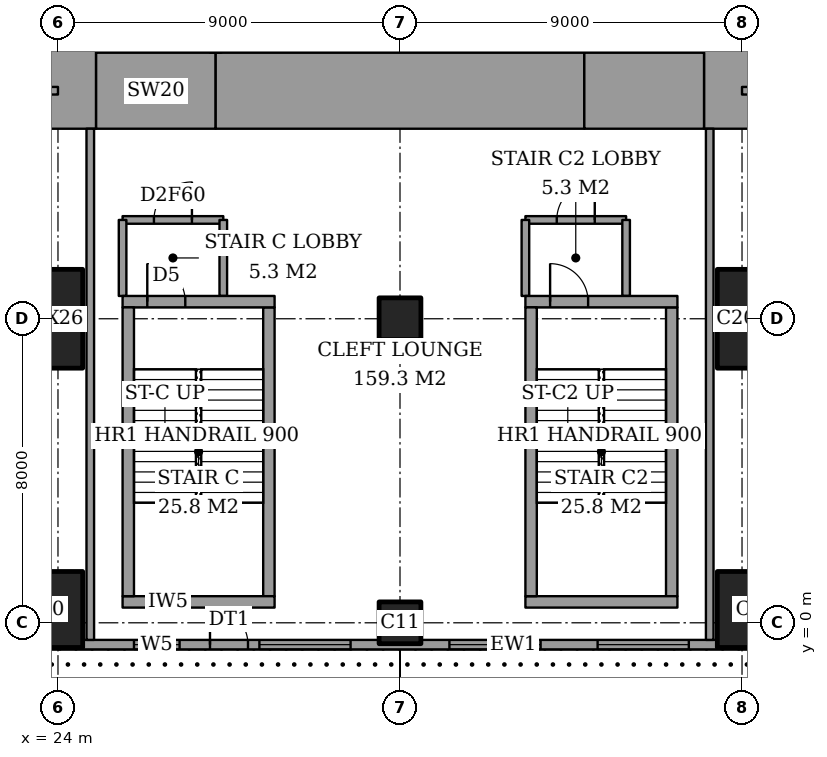
"""IFC4 building model, lengths in metres.
Left out: names, types, materials, properties, quantities, classifications, styles, units other than length and angle.
Written with IfcOpenShell. Run it as: python <this file> out.ifc"""

import sys

from ifc_helpers import new_model, si_unit, direction, frame, frame_2d, origin, origin_2d, place, context, subcontext, project, spatial, rectangle, extrude, element, fill, save


model = new_model("IFC4")
c1 = context("Model", 3, precision=1e-05, world=origin(), true_north=direction((0.0, 1.0)))
c2 = subcontext(c1, "Body", "Model", "MODEL_VIEW")
j1 = project(units=[si_unit("LENGTHUNIT", "METRE"), si_unit("PLANEANGLEUNIT", "RADIAN")], contexts=[c1])
p1 = place(None, origin())
s1 = spatial("IfcSite", under=j1, at=p1, CompositionType="ELEMENT")
p2 = place(p1, origin())
s2 = spatial("IfcBuilding", under=s1, at=p2, CompositionType="ELEMENT")
p3 = place(p2, frame((0.0, 0.0, 16.0)))
s3 = spatial("IfcBuildingStorey", under=s2, at=p3, CompositionType="ELEMENT", Elevation=16.0)
p4 = place(p3, frame((23.65, 0.35, 0.0), z_axis=(0.0, 0.0, 1.0), x_axis=(1.0, 0.0, 0.0)))
e1 = element("IfcColumn", 1, at=p4, inside=s3, PredefinedType="COLUMN", context=c2, shape_type="SweptSolid", body=[
    extrude(rectangle(XDim=2.0, YDim=2.0, at=origin_2d()), origin(), (0.0, 0.0, 1.0), 5.0),
])
p5 = place(p3, frame((23.65, 8.0, 0.0), z_axis=(0.0, 0.0, 1.0), x_axis=(1.0, 0.0, 0.0)))
e2 = element("IfcColumn", 2, at=p5, inside=s3, PredefinedType="COLUMN", context=c2, shape_type="SweptSolid", body=[
    extrude(rectangle(XDim=2.0, YDim=2.6, at=origin_2d()), origin(), (0.0, 0.0, 1.0), 5.0),
])
for number, where, z_axis, x_axis in (
    (3, (33.0, 0.0, 0.0), (0.0, 0.0, 1.0), (1.0, 0.0, 0.0)),
    (4, (33.0, 8.0, 0.0), (0.0, 0.0, 1.0), (1.0, 0.0, 0.0)),
):
    element("IfcColumn", number, at=place(p3, frame(where, z_axis=z_axis, x_axis=x_axis)), inside=s3, PredefinedType="COLUMN", context=c2, shape_type="SweptSolid", body=[
        extrude(rectangle(XDim=1.1, YDim=1.1, at=origin_2d()), origin(), (0.0, 0.0, 1.0), 5.0),
    ])
p6 = place(p3, frame((42.35, 0.35, 0.0), z_axis=(0.0, 0.0, 1.0), x_axis=(1.0, 0.0, 0.0)))
e5 = element("IfcColumn", 5, at=p6, inside=s3, PredefinedType="COLUMN", context=c2, shape_type="SweptSolid", body=[
    extrude(rectangle(XDim=2.0, YDim=2.0, at=origin_2d()), origin(), (0.0, 0.0, 1.0), 5.0),
])
p7 = place(p3, frame((42.35, 8.0, 0.0), z_axis=(0.0, 0.0, 1.0), x_axis=(1.0, 0.0, 0.0)))
e6 = element("IfcColumn", 6, at=p7, inside=s3, PredefinedType="COLUMN", context=c2, shape_type="SweptSolid", body=[
    extrude(rectangle(XDim=2.0, YDim=2.6, at=origin_2d()), origin(), (0.0, 0.0, 1.0), 5.0),
])
p8 = place(p3, frame((25.0, 14.0, 0.0), z_axis=(0.0, 0.0, 1.0), x_axis=(1.0, 0.0, 0.0)))
e7 = element("IfcWall", 7, at=p8, inside=s3, PredefinedType="SHEAR", context=c2, shape_type="SweptSolid", body=[
    extrude(rectangle(XDim=3.15, YDim=2.0, at=frame_2d((1.575, 0.0))), origin(), (0.0, 0.0, 1.0), 5.0),
])
p9 = place(p3, frame((28.15, 14.0, 0.0), z_axis=(0.0, 0.0, 1.0), x_axis=(1.0, 0.0, 0.0)))
e8 = element("IfcWall", 8, at=p9, inside=s3, PredefinedType="SHEAR", context=c2, shape_type="SweptSolid", body=[
    extrude(rectangle(XDim=9.7, YDim=2.0, at=frame_2d((4.85, 0.0))), origin(), (0.0, 0.0, 1.0), 5.0),
])
p10 = place(p3, frame((37.85, 14.0, 0.0), z_axis=(0.0, 0.0, 1.0), x_axis=(1.0, 0.0, 0.0)))
e9 = element("IfcWall", 9, at=p10, inside=s3, PredefinedType="SHEAR", context=c2, shape_type="SweptSolid", body=[
    extrude(rectangle(XDim=3.15, YDim=2.0, at=frame_2d((1.575, 0.0))), origin(), (0.0, 0.0, 1.0), 5.0),
])
p11 = place(p3, frame((24.3, 13.0, 0.0), z_axis=(0.0, 0.0, 1.0), x_axis=(0.0, 1.0, 0.0)))
e10 = element("IfcWall", 10, at=p11, inside=s3, PredefinedType="SHEAR", context=c2, shape_type="SweptSolid", body=[
    extrude(rectangle(XDim=10.15, YDim=1.4, at=frame_2d((5.075, 0.0))), origin(), (0.0, 0.0, 1.0), 5.0),
])
p12 = place(p3, frame((41.7, 13.0, 0.0), z_axis=(0.0, 0.0, 1.0), x_axis=(0.0, 1.0, 0.0)))
e11 = element("IfcWall", 11, at=p12, inside=s3, PredefinedType="SHEAR", context=c2, shape_type="SweptSolid", body=[
    extrude(rectangle(XDim=11.85, YDim=1.4, at=frame_2d((5.925, 0.0))), origin(), (0.0, 0.0, 1.0), 5.0),
])
p13 = place(p12, frame((7.5, 0.0, 0.0)))
e12 = element("IfcOpeningElement", 12, at=p13, cuts=e11, PredefinedType="OPENING", context=c2, shape_type="SweptSolid", body=[
    extrude(rectangle(XDim=1.8, YDim=2.4, at=frame_2d((0.9, 1.2))), frame((0.0, 0.71, 0.0), z_axis=(0.0, -1.0, 0.0), x_axis=(1.0, 0.0, 0.0)), (0.0, 0.0, 1.0), 1.42),
])
p14 = place(p3, frame((3.175, -0.575, 0.0), z_axis=(0.0, 0.0, 1.0), x_axis=(1.0, 0.0, 0.0)))
e13 = element("IfcWall", 13, at=p14, inside=s3, PredefinedType="SOLIDWALL", context=c2, shape_type="SweptSolid", body=[
    extrude(rectangle(XDim=59.65, YDim=0.25, at=frame_2d((29.825, 0.0))), origin(), (0.0, 0.0, 1.0), 5.0),
])
p15 = place(p14, frame((8.325, 0.0, 0.0)))
e14 = element("IfcOpeningElement", 14, at=p15, cuts=e13, PredefinedType="OPENING", context=c2, shape_type="SweptSolid", body=[
    extrude(rectangle(XDim=1.0, YDim=2.4, at=frame_2d((0.5, 1.2))), frame((0.0, 0.135, 0.0), z_axis=(0.0, -1.0, 0.0), x_axis=(1.0, 0.0, 0.0)), (0.0, 0.0, 1.0), 0.27),
])
p16 = place(p14, frame((15.45, 0.0, 0.6)))
e15 = element("IfcOpeningElement", 15, at=p16, cuts=e13, PredefinedType="OPENING", context=c2, shape_type="SweptSolid", body=[
    extrude(rectangle(XDim=2.4, YDim=3.0, at=frame_2d((1.2, 1.5))), frame((0.0, 0.135, 0.0), z_axis=(0.0, -1.0, 0.0), x_axis=(1.0, 0.0, 0.0)), (0.0, 0.0, 1.0), 0.27),
])
p17 = place(p14, frame((24.825, 0.0, 0.0)))
e16 = element("IfcOpeningElement", 16, at=p17, cuts=e13, PredefinedType="OPENING", context=c2, shape_type="SweptSolid", body=[
    extrude(rectangle(XDim=1.0, YDim=2.4, at=frame_2d((0.5, 1.2))), frame((0.0, 0.135, 0.0), z_axis=(0.0, -1.0, 0.0), x_axis=(1.0, 0.0, 0.0)), (0.0, 0.0, 1.0), 0.27),
])
p18 = place(p14, frame((22.825, 0.0, 0.6)))
e17 = element("IfcOpeningElement", 17, at=p18, cuts=e13, PredefinedType="OPENING", context=c2, shape_type="SweptSolid", body=[
    extrude(rectangle(XDim=1.2, YDim=3.0, at=frame_2d((0.6, 1.5))), frame((0.0, 0.135, 0.0), z_axis=(0.0, -1.0, 0.0), x_axis=(1.0, 0.0, 0.0)), (0.0, 0.0, 1.0), 0.27),
])
p19 = place(p14, frame((26.125, 0.0, 0.6)))
e18 = element("IfcOpeningElement", 18, at=p19, cuts=e13, PredefinedType="OPENING", context=c2, shape_type="SweptSolid", body=[
    extrude(rectangle(XDim=2.4, YDim=3.0, at=frame_2d((1.2, 1.5))), frame((0.0, 0.135, 0.0), z_axis=(0.0, -1.0, 0.0), x_axis=(1.0, 0.0, 0.0)), (0.0, 0.0, 1.0), 0.27),
])
p20 = place(p14, frame((31.125, 0.0, 0.6)))
e19 = element("IfcOpeningElement", 19, at=p20, cuts=e13, PredefinedType="OPENING", context=c2, shape_type="SweptSolid", body=[
    extrude(rectangle(XDim=2.4, YDim=3.0, at=frame_2d((1.2, 1.5))), frame((0.0, 0.135, 0.0), z_axis=(0.0, -1.0, 0.0), x_axis=(1.0, 0.0, 0.0)), (0.0, 0.0, 1.0), 0.27),
])
p21 = place(p14, frame((35.025, 0.0, 0.6)))
e20 = element("IfcOpeningElement", 20, at=p21, cuts=e13, PredefinedType="OPENING", context=c2, shape_type="SweptSolid", body=[
    extrude(rectangle(XDim=2.4, YDim=3.0, at=frame_2d((1.2, 1.5))), frame((0.0, 0.135, 0.0), z_axis=(0.0, -1.0, 0.0), x_axis=(1.0, 0.0, 0.0)), (0.0, 0.0, 1.0), 0.27),
])
p22 = place(p14, frame((50.325, 0.0, 0.0)))
e21 = element("IfcOpeningElement", 21, at=p22, cuts=e13, PredefinedType="OPENING", context=c2, shape_type="SweptSolid", body=[
    extrude(rectangle(XDim=1.0, YDim=2.4, at=frame_2d((0.5, 1.2))), frame((0.0, 0.135, 0.0), z_axis=(0.0, -1.0, 0.0), x_axis=(1.0, 0.0, 0.0)), (0.0, 0.0, 1.0), 0.27),
])
p23 = place(p14, frame((41.8, 0.0, 0.6)))
e22 = element("IfcOpeningElement", 22, at=p23, cuts=e13, PredefinedType="OPENING", context=c2, shape_type="SweptSolid", body=[
    extrude(rectangle(XDim=2.4, YDim=3.0, at=frame_2d((1.2, 1.5))), frame((0.0, 0.135, 0.0), z_axis=(0.0, -1.0, 0.0), x_axis=(1.0, 0.0, 0.0)), (0.0, 0.0, 1.0), 0.27),
])
p24 = place(p14, frame((48.725, 0.0, 0.6)))
e23 = element("IfcOpeningElement", 23, at=p24, cuts=e13, PredefinedType="OPENING", context=c2, shape_type="SweptSolid", body=[
    extrude(rectangle(XDim=1.2, YDim=3.0, at=frame_2d((0.6, 1.5))), frame((0.0, 0.135, 0.0), z_axis=(0.0, -1.0, 0.0), x_axis=(1.0, 0.0, 0.0)), (0.0, 0.0, 1.0), 0.27),
])
p25 = place(p14, frame((51.725, 0.0, 0.6)))
e24 = element("IfcOpeningElement", 24, at=p25, cuts=e13, PredefinedType="OPENING", context=c2, shape_type="SweptSolid", body=[
    extrude(rectangle(XDim=1.2, YDim=3.0, at=frame_2d((0.6, 1.5))), frame((0.0, 0.135, 0.0), z_axis=(0.0, -1.0, 0.0), x_axis=(1.0, 0.0, 0.0)), (0.0, 0.0, 1.0), 0.27),
])
p26 = place(p14, frame((56.125, 0.0, 0.6)))
e25 = element("IfcOpeningElement", 25, at=p26, cuts=e13, PredefinedType="OPENING", context=c2, shape_type="SweptSolid", body=[
    extrude(rectangle(XDim=2.4, YDim=3.0, at=frame_2d((1.2, 1.5))), frame((0.0, 0.135, 0.0), z_axis=(0.0, -1.0, 0.0), x_axis=(1.0, 0.0, 0.0)), (0.0, 0.0, 1.0), 0.27),
])
p27 = place(p3, frame((25.7, 10.6, 0.0), z_axis=(0.0, 0.0, 1.0), x_axis=(1.0, 0.0, 0.0)))
e26 = element("IfcWall", 26, at=p27, inside=s3, PredefinedType="PARTITIONING", context=c2, shape_type="SweptSolid", body=[
    extrude(rectangle(XDim=2.65, YDim=0.2, at=frame_2d((1.325, 0.0))), origin(), (0.0, 0.0, 1.0), 4.7),
])
p28 = place(p27, frame((0.825, 0.0, 0.0)))
e27 = element("IfcOpeningElement", 27, at=p28, cuts=e26, PredefinedType="OPENING", context=c2, shape_type="SweptSolid", body=[
    extrude(rectangle(XDim=1.0, YDim=2.1, at=frame_2d((0.5, 1.05))), frame((0.0, 0.11, 0.0), z_axis=(0.0, -1.0, 0.0), x_axis=(1.0, 0.0, 0.0)), (0.0, 0.0, 1.0), 0.22),
])
p29 = place(p3, frame((36.3, 10.6, 0.0), z_axis=(0.0, 0.0, 1.0), x_axis=(1.0, 0.0, 0.0)))
e28 = element("IfcWall", 28, at=p29, inside=s3, PredefinedType="PARTITIONING", context=c2, shape_type="SweptSolid", body=[
    extrude(rectangle(XDim=2.65, YDim=0.2, at=frame_2d((1.325, 0.0))), origin(), (0.0, 0.0, 1.0), 4.7),
])
p30 = place(p29, frame((0.825, 0.0, 0.0)))
e29 = element("IfcOpeningElement", 29, at=p30, cuts=e28, PredefinedType="OPENING", context=c2, shape_type="SweptSolid", body=[
    extrude(rectangle(XDim=1.0, YDim=2.1, at=frame_2d((0.5, 1.05))), frame((0.0, 0.11, 0.0), z_axis=(0.0, -1.0, 0.0), x_axis=(1.0, 0.0, 0.0)), (0.0, 0.0, 1.0), 0.22),
])
p31 = place(p3, frame((14.0, 14.0, 0.0), z_axis=(0.0, 0.0, 1.0), x_axis=(1.0, 0.0, 0.0)))
e30 = element("IfcWall", 30, at=p31, inside=s3, PredefinedType="PARTITIONING", context=c2, shape_type="SweptSolid", body=[
    extrude(rectangle(XDim=10.0, YDim=0.2, at=frame_2d((5.0, 0.0))), origin(), (0.0, 0.0, 1.0), 4.7),
])
p32 = place(p3, frame((42.0, 14.0, 0.0), z_axis=(0.0, 0.0, 1.0), x_axis=(1.0, 0.0, 0.0)))
e31 = element("IfcWall", 31, at=p32, inside=s3, PredefinedType="PARTITIONING", context=c2, shape_type="SweptSolid", body=[
    extrude(rectangle(XDim=1.5, YDim=0.2, at=frame_2d((0.75, 0.0))), origin(), (0.0, 0.0, 1.0), 4.7),
])
p33 = place(p3, frame((24.85, -0.45, 0.0), z_axis=(0.0, 0.0, 1.0), x_axis=(0.0, 1.0, 0.0)))
e32 = element("IfcWall", 32, at=p33, inside=s3, PredefinedType="PARTITIONING", context=c2, shape_type="SweptSolid", body=[
    extrude(rectangle(XDim=13.45, YDim=0.2, at=frame_2d((6.725, 0.0))), origin(), (0.0, 0.0, 1.0), 4.7),
])
for number, where, z_axis, x_axis in (
    (33, (25.7, 8.6, 0.0), (0.0, 0.0, 1.0), (0.0, 1.0, 0.0)),
    (34, (28.35, 8.6, 0.0), (0.0, 0.0, 1.0), (0.0, 1.0, 0.0)),
    (35, (36.3, 8.6, 0.0), (0.0, 0.0, 1.0), (0.0, 1.0, 0.0)),
    (36, (38.95, 8.6, 0.0), (0.0, 0.0, 1.0), (0.0, 1.0, 0.0)),
):
    element("IfcWall", number, at=place(p3, frame(where, z_axis=z_axis, x_axis=x_axis)), inside=s3, PredefinedType="PARTITIONING", context=c2, shape_type="SweptSolid", body=[
        extrude(rectangle(XDim=2.0, YDim=0.2, at=frame_2d((1.0, 0.0))), origin(), (0.0, 0.0, 1.0), 4.7),
    ])
p34 = place(p3, frame((41.15, -0.45, 0.0), z_axis=(0.0, 0.0, 1.0), x_axis=(0.0, 1.0, 0.0)))
e37 = element("IfcWall", 37, at=p34, inside=s3, PredefinedType="PARTITIONING", context=c2, shape_type="SweptSolid", body=[
    extrude(rectangle(XDim=13.45, YDim=0.2, at=frame_2d((6.725, 0.0))), origin(), (0.0, 0.0, 1.0), 4.7),
])
for number, where, z_axis, x_axis in (
    (38, (31.4, 15.0, 0.0), (0.0, 0.0, 1.0), (0.0, 1.0, 0.0)),
    (39, (34.6, 15.0, 0.0), (0.0, 0.0, 1.0), (0.0, 1.0, 0.0)),
):
    element("IfcWall", number, at=place(p3, frame(where, z_axis=z_axis, x_axis=x_axis)), inside=s3, PredefinedType="PARTITIONING", context=c2, shape_type="SweptSolid", body=[
        extrude(rectangle(XDim=2.8, YDim=0.2, at=frame_2d((1.4, 0.0))), origin(), (0.0, 0.0, 1.0), 5.0),
    ])
p35 = place(p3, frame((37.85, 15.0, 0.0), z_axis=(0.0, 0.0, 1.0), x_axis=(0.0, 1.0, 0.0)))
e40 = element("IfcWall", 40, at=p35, inside=s3, PredefinedType="SHEAR", context=c2, shape_type="SweptSolid", body=[
    extrude(rectangle(XDim=2.8, YDim=0.3, at=frame_2d((1.4, 0.0))), origin(), (0.0, 0.0, 1.0), 5.0),
])
p36 = place(p3, frame((25.7, 0.55, 0.0), z_axis=(0.0, 0.0, 1.0), x_axis=(1.0, 0.0, 0.0)))
e41 = element("IfcWall", 41, at=p36, inside=s3, PredefinedType="PARTITIONING", context=c2, shape_type="SweptSolid", body=[
    extrude(rectangle(XDim=4.0, YDim=0.3, at=frame_2d((2.0, 0.0))), origin(), (0.0, 0.0, 1.0), 5.0),
])
p37 = place(p3, frame((25.7, 8.45, 0.0), z_axis=(0.0, 0.0, 1.0), x_axis=(1.0, 0.0, 0.0)))
e42 = element("IfcWall", 42, at=p37, inside=s3, PredefinedType="PARTITIONING", context=c2, shape_type="SweptSolid", body=[
    extrude(rectangle(XDim=4.0, YDim=0.3, at=frame_2d((2.0, 0.0))), origin(), (0.0, 0.0, 1.0), 5.0),
])
p38 = place(p37, frame((0.65, 0.0, 0.0)))
e43 = element("IfcOpeningElement", 43, at=p38, cuts=e42, PredefinedType="OPENING", context=c2, shape_type="SweptSolid", body=[
    extrude(rectangle(XDim=1.0, YDim=2.1, at=frame_2d((0.5, 1.05))), frame((0.0, 0.16, 0.0), z_axis=(0.0, -1.0, 0.0), x_axis=(1.0, 0.0, 0.0)), (0.0, 0.0, 1.0), 0.32),
])
for number, where, z_axis, x_axis in (
    (44, (25.85, 0.7, 0.0), (0.0, 0.0, 1.0), (0.0, 1.0, 0.0)),
    (45, (29.55, 0.7, 0.0), (0.0, 0.0, 1.0), (0.0, 1.0, 0.0)),
):
    element("IfcWall", number, at=place(p3, frame(where, z_axis=z_axis, x_axis=x_axis)), inside=s3, PredefinedType="PARTITIONING", context=c2, shape_type="SweptSolid", body=[
        extrude(rectangle(XDim=7.6, YDim=0.3, at=frame_2d((3.8, 0.0))), origin(), (0.0, 0.0, 1.0), 5.0),
    ])
p39 = place(p3, frame((36.3, 0.55, 0.0), z_axis=(0.0, 0.0, 1.0), x_axis=(1.0, 0.0, 0.0)))
e46 = element("IfcWall", 46, at=p39, inside=s3, PredefinedType="PARTITIONING", context=c2, shape_type="SweptSolid", body=[
    extrude(rectangle(XDim=4.0, YDim=0.3, at=frame_2d((2.0, 0.0))), origin(), (0.0, 0.0, 1.0), 5.0),
])
p40 = place(p3, frame((36.3, 8.45, 0.0), z_axis=(0.0, 0.0, 1.0), x_axis=(1.0, 0.0, 0.0)))
e47 = element("IfcWall", 47, at=p40, inside=s3, PredefinedType="PARTITIONING", context=c2, shape_type="SweptSolid", body=[
    extrude(rectangle(XDim=4.0, YDim=0.3, at=frame_2d((2.0, 0.0))), origin(), (0.0, 0.0, 1.0), 5.0),
])
p41 = place(p40, frame((0.65, 0.0, 0.0)))
e48 = element("IfcOpeningElement", 48, at=p41, cuts=e47, PredefinedType="OPENING", context=c2, shape_type="SweptSolid", body=[
    extrude(rectangle(XDim=1.0, YDim=2.1, at=frame_2d((0.5, 1.05))), frame((0.0, 0.16, 0.0), z_axis=(0.0, -1.0, 0.0), x_axis=(1.0, 0.0, 0.0)), (0.0, 0.0, 1.0), 0.32),
])
for number, where, z_axis, x_axis in (
    (49, (36.45, 0.7, 0.0), (0.0, 0.0, 1.0), (0.0, 1.0, 0.0)),
    (50, (40.15, 0.7, 0.0), (0.0, 0.0, 1.0), (0.0, 1.0, 0.0)),
):
    element("IfcWall", number, at=place(p3, frame(where, z_axis=z_axis, x_axis=x_axis)), inside=s3, PredefinedType="PARTITIONING", context=c2, shape_type="SweptSolid", body=[
        extrude(rectangle(XDim=7.6, YDim=0.3, at=frame_2d((3.8, 0.0))), origin(), (0.0, 0.0, 1.0), 5.0),
    ])
p42 = place(p17, origin())
e51 = element("IfcDoor", 51, at=p42, inside=s3, OperationType="SINGLE_SWING_RIGHT", PredefinedType="DOOR", context=c2, shape_type="SweptSolid", body=[
    extrude(rectangle(XDim=1.0, YDim=2.4, at=frame_2d((0.5, 1.2))), frame((0.0, 0.025, 0.0), z_axis=(0.0, -1.0, 0.0), x_axis=(1.0, 0.0, 0.0)), (0.0, 0.0, 1.0), 0.05),
])
fill(e16, e51)
p43 = place(p18, origin())
e52 = element("IfcWindow", 52, at=p43, inside=s3, PartitioningType="SINGLE_PANEL", PredefinedType="WINDOW", context=c2, shape_type="SweptSolid", body=[
    extrude(rectangle(XDim=1.2, YDim=3.0, at=frame_2d((0.6, 1.5))), frame((0.0, 0.03, 0.0), z_axis=(0.0, -1.0, 0.0), x_axis=(1.0, 0.0, 0.0)), (0.0, 0.0, 1.0), 0.06),
])
fill(e17, e52)
p44 = place(p19, origin())
e53 = element("IfcWindow", 53, at=p44, inside=s3, PartitioningType="SINGLE_PANEL", PredefinedType="WINDOW", context=c2, shape_type="SweptSolid", body=[
    extrude(rectangle(XDim=2.4, YDim=3.0, at=frame_2d((1.2, 1.5))), frame((0.0, 0.03, 0.0), z_axis=(0.0, -1.0, 0.0), x_axis=(1.0, 0.0, 0.0)), (0.0, 0.0, 1.0), 0.06),
])
fill(e18, e53)
p45 = place(p20, origin())
e54 = element("IfcWindow", 54, at=p45, inside=s3, PartitioningType="SINGLE_PANEL", PredefinedType="WINDOW", context=c2, shape_type="SweptSolid", body=[
    extrude(rectangle(XDim=2.4, YDim=3.0, at=frame_2d((1.2, 1.5))), frame((0.0, 0.03, 0.0), z_axis=(0.0, -1.0, 0.0), x_axis=(1.0, 0.0, 0.0)), (0.0, 0.0, 1.0), 0.06),
])
fill(e19, e54)
p46 = place(p21, origin())
e55 = element("IfcWindow", 55, at=p46, inside=s3, PartitioningType="SINGLE_PANEL", PredefinedType="WINDOW", context=c2, shape_type="SweptSolid", body=[
    extrude(rectangle(XDim=2.4, YDim=3.0, at=frame_2d((1.2, 1.5))), frame((0.0, 0.03, 0.0), z_axis=(0.0, -1.0, 0.0), x_axis=(1.0, 0.0, 0.0)), (0.0, 0.0, 1.0), 0.06),
])
fill(e20, e55)
p47 = place(p28, origin())
e56 = element("IfcDoor", 56, at=p47, inside=s3, OperationType="SINGLE_SWING_LEFT", PredefinedType="DOOR", context=c2, shape_type="SweptSolid", body=[
    extrude(rectangle(XDim=1.0, YDim=2.1, at=frame_2d((0.5, 1.05))), frame((0.0, 0.025, 0.0), z_axis=(0.0, -1.0, 0.0), x_axis=(1.0, 0.0, 0.0)), (0.0, 0.0, 1.0), 0.05),
])
fill(e27, e56)
p48 = place(p30, origin())
e57 = element("IfcDoor", 57, at=p48, inside=s3, OperationType="SINGLE_SWING_LEFT", PredefinedType="DOOR", context=c2, shape_type="SweptSolid", body=[
    extrude(rectangle(XDim=1.0, YDim=2.1, at=frame_2d((0.5, 1.05))), frame((0.0, 0.025, 0.0), z_axis=(0.0, -1.0, 0.0), x_axis=(1.0, 0.0, 0.0)), (0.0, 0.0, 1.0), 0.05),
])
fill(e29, e57)
p49 = place(p38, origin())
e58 = element("IfcDoor", 58, at=p49, inside=s3, OperationType="SINGLE_SWING_RIGHT", PredefinedType="DOOR", context=c2, shape_type="SweptSolid", body=[
    extrude(rectangle(XDim=1.0, YDim=2.1, at=frame_2d((0.5, 1.05))), frame((0.0, 0.025, 0.0), z_axis=(0.0, -1.0, 0.0), x_axis=(1.0, 0.0, 0.0)), (0.0, 0.0, 1.0), 0.05),
])
fill(e43, e58)
p50 = place(p41, origin())
e59 = element("IfcDoor", 59, at=p50, inside=s3, OperationType="SINGLE_SWING_RIGHT", PredefinedType="DOOR", context=c2, shape_type="SweptSolid", body=[
    extrude(rectangle(XDim=1.0, YDim=2.1, at=frame_2d((0.5, 1.05))), frame((0.0, 0.025, 0.0), z_axis=(0.0, -1.0, 0.0), x_axis=(1.0, 0.0, 0.0)), (0.0, 0.0, 1.0), 0.05),
])
fill(e48, e59)
save(model, sys.argv[1])
